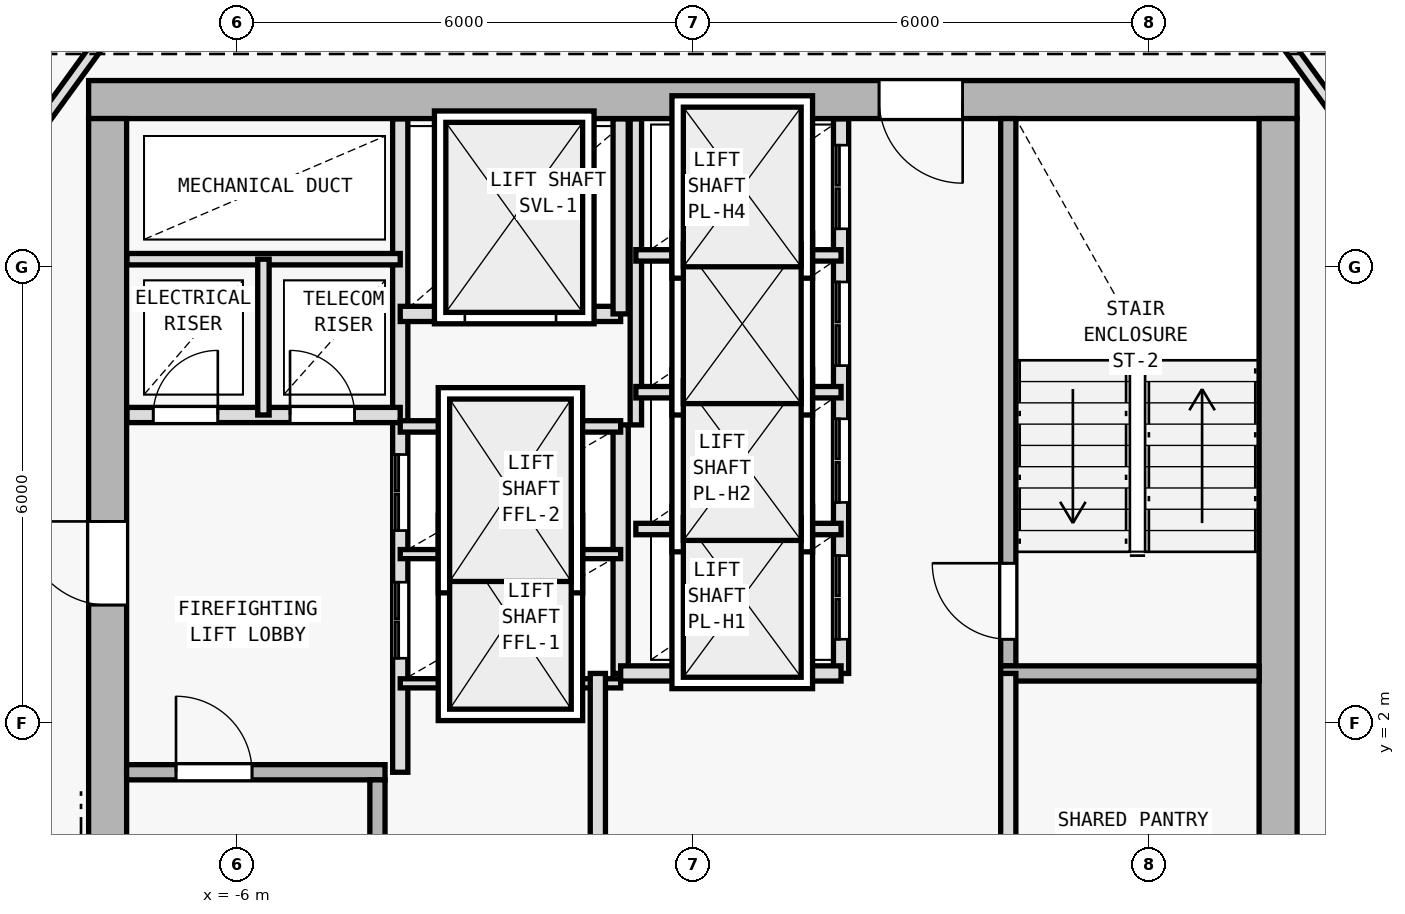
"""IFC4 building model, lengths in metres.
Left out: names, types, materials, properties, quantities, classifications, styles, units other than length and angle.
Written with IfcOpenShell. Run it as: python <this file> out.ifc"""

import sys

from ifc_helpers import new_model, si_unit, direction, frame, frame_2d, origin, origin_2d, place, context, subcontext, project, spatial, rectangle, i_section, extrude, element, fill, save


model = new_model("IFC4")
c1 = context("Model", 3, precision=1e-05, world=origin(), true_north=direction((0.0, 1.0)))
c2 = subcontext(c1, "Body", "Model", "MODEL_VIEW")
j1 = project(units=[si_unit("LENGTHUNIT", "METRE"), si_unit("PLANEANGLEUNIT", "RADIAN")], contexts=[c1])
p1 = place(None, origin())
s1 = spatial("IfcSite", under=j1, at=p1, CompositionType="ELEMENT")
p2 = place(p1, origin())
s2 = spatial("IfcBuilding", under=s1, at=p2, CompositionType="ELEMENT")
p3 = place(p2, frame((0.0, 0.0, 219.9)))
s3 = spatial("IfcBuildingStorey", under=s2, at=p3, CompositionType="ELEMENT", Elevation=219.9)
for number, where, z_axis, x_axis in (
    (1, (7.7, 10.2, 0.0), (0.0, 0.0, 1.0), (1.0, 0.0, 0.0)),
    (2, (-7.7, 10.2, 0.0), (0.0, 0.0, 1.0), (1.0, 0.0, 0.0)),
    (3, (7.7, 0.4, 0.0), (0.0, 0.0, 1.0), (1.0, 0.0, 0.0)),
    (4, (-7.7, 2.0, 0.0), (0.0, 0.0, 1.0), (1.0, 0.0, 0.0)),
):
    element("IfcColumn", number, at=place(p3, frame(where, z_axis=z_axis, x_axis=x_axis)), inside=s3, PredefinedType="COLUMN", context=c2, shape_type="SweptSolid", body=[
        extrude(i_section(OverallWidth=0.398, OverallDepth=0.387, WebThickness=0.013, FlangeThickness=0.022, FilletRadius=0.015, at=origin_2d()), origin(), (0.0, 0.0, 1.0), 3.6),
    ])
p4 = place(p3, frame((7.95, 10.2, 0.0), z_axis=(0.0, 0.0, 1.0), x_axis=(-1.0, 0.0, 0.0)))
e5 = element("IfcWall", 5, at=p4, inside=s3, PredefinedType="SHEAR", context=c2, shape_type="SweptSolid", body=[
    extrude(rectangle(XDim=15.9, YDim=0.5, at=frame_2d((7.95, 0.0))), origin(), (0.0, 0.0, 1.0), 3.35),
])
p5 = place(p4, frame((4.4, 0.0, 0.0)))
e6 = element("IfcOpeningElement", 6, at=p5, cuts=e5, PredefinedType="OPENING", context=c2, shape_type="SweptSolid", body=[
    extrude(rectangle(XDim=1.1, YDim=2.15, at=frame_2d((0.55, 1.075))), frame((0.0, 0.26, 0.0), z_axis=(0.0, -1.0, 0.0), x_axis=(1.0, 0.0, 0.0)), (0.0, 0.0, 1.0), 0.52),
])
p6 = place(p3, frame((-7.7, -9.15, 0.0), z_axis=(0.0, 0.0, 1.0), x_axis=(0.0, 1.0, 0.0)))
e7 = element("IfcWall", 7, at=p6, inside=s3, PredefinedType="SHEAR", context=c2, shape_type="SweptSolid", body=[
    extrude(rectangle(XDim=19.1, YDim=0.5, at=frame_2d((9.55, 0.0))), origin(), (0.0, 0.0, 1.0), 3.35),
])
p7 = place(p6, frame((12.7, 0.0, 0.0)))
e8 = element("IfcOpeningElement", 8, at=p7, cuts=e7, PredefinedType="OPENING", context=c2, shape_type="SweptSolid", body=[
    extrude(rectangle(XDim=1.1, YDim=2.15, at=frame_2d((0.55, 1.075))), frame((0.0, 0.26, 0.0), z_axis=(0.0, -1.0, 0.0), x_axis=(1.0, 0.0, 0.0)), (0.0, 0.0, 1.0), 0.52),
])
p8 = place(p3, frame((7.7, 9.95, 0.0), z_axis=(0.0, 0.0, 1.0), x_axis=(0.0, -1.0, 0.0)))
e9 = element("IfcWall", 9, at=p8, inside=s3, PredefinedType="SHEAR", context=c2, shape_type="SweptSolid", body=[
    extrude(rectangle(XDim=19.1, YDim=0.5, at=frame_2d((9.55, 0.0))), origin(), (0.0, 0.0, 1.0), 3.35),
])
p9 = place(p3, frame((-7.45, 1.35, 0.0), z_axis=(0.0, 0.0, 1.0), x_axis=(1.0, 0.0, 0.0)))
e10 = element("IfcWall", 10, at=p9, inside=s3, PredefinedType="SOLIDWALL", context=c2, shape_type="SweptSolid", body=[
    extrude(rectangle(XDim=3.4, YDim=0.2, at=frame_2d((1.7, 0.0))), origin(), (0.0, 0.0, 1.0), 3.35),
])
p10 = place(p9, frame((0.65, 0.0, 0.0)))
e11 = element("IfcOpeningElement", 11, at=p10, cuts=e10, PredefinedType="OPENING", context=c2, shape_type="SweptSolid", body=[
    extrude(rectangle(XDim=1.0, YDim=2.15, at=frame_2d((0.5, 1.075))), frame((0.0, 0.11, 0.0), z_axis=(0.0, -1.0, 0.0), x_axis=(1.0, 0.0, 0.0)), (0.0, 0.0, 1.0), 0.22),
])
p11 = place(p3, frame((-4.15, -5.95, 0.0), z_axis=(0.0, 0.0, 1.0), x_axis=(0.0, 1.0, 0.0)))
e12 = element("IfcWall", 12, at=p11, inside=s3, PredefinedType="SOLIDWALL", context=c2, shape_type="SweptSolid", body=[
    extrude(rectangle(XDim=7.2, YDim=0.2, at=frame_2d((3.6, 0.0))), origin(), (0.0, 0.0, 1.0), 3.35),
])
p12 = place(p3, frame((-3.85, 1.35, 0.0), z_axis=(0.0, 0.0, 1.0), x_axis=(0.0, 1.0, 0.0)))
e13 = element("IfcWall", 13, at=p12, inside=s3, PredefinedType="SOLIDWALL", context=c2, shape_type="SweptSolid", body=[
    extrude(rectangle(XDim=8.595, YDim=0.2, at=frame_2d((4.297, 0.0))), origin(), (0.0, 0.0, 1.0), 3.35),
])
p13 = place(p12, frame((1.5, 0.0, 0.0)))
e14 = element("IfcOpeningElement", 14, at=p13, cuts=e13, PredefinedType="OPENING", context=c2, shape_type="SweptSolid", body=[
    extrude(rectangle(XDim=1.0, YDim=2.15, at=frame_2d((0.5, 1.075))), frame((0.0, 0.11, 0.0), z_axis=(0.0, -1.0, 0.0), x_axis=(1.0, 0.0, 0.0)), (0.0, 0.0, 1.0), 0.22),
])
p14 = place(p12, frame((3.18, 0.0, 0.0)))
e15 = element("IfcOpeningElement", 15, at=p14, cuts=e13, PredefinedType="OPENING", context=c2, shape_type="SweptSolid", body=[
    extrude(rectangle(XDim=1.0, YDim=2.15, at=frame_2d((0.5, 1.075))), frame((0.0, 0.11, 0.0), z_axis=(0.0, -1.0, 0.0), x_axis=(1.0, 0.0, 0.0)), (0.0, 0.0, 1.0), 0.22),
])
p15 = place(p3, frame((-7.445, 6.05, 0.0), z_axis=(0.0, 0.0, 1.0), x_axis=(1.0, 0.0, 0.0)))
e16 = element("IfcWall", 16, at=p15, inside=s3, PredefinedType="SOLIDWALL", context=c2, shape_type="SweptSolid", body=[
    extrude(rectangle(XDim=3.595, YDim=0.2, at=frame_2d((1.797, 0.0))), origin(), (0.0, 0.0, 1.0), 3.35),
])
p16 = place(p15, frame((0.345, 0.0, 0.0)))
e17 = element("IfcOpeningElement", 17, at=p16, cuts=e16, PredefinedType="OPENING", context=c2, shape_type="SweptSolid", body=[
    extrude(rectangle(XDim=0.85, YDim=2.1, at=frame_2d((0.425, 1.05))), frame((0.0, 0.11, 0.0), z_axis=(0.0, -1.0, 0.0), x_axis=(1.0, 0.0, 0.0)), (0.0, 0.0, 1.0), 0.22),
])
p17 = place(p15, frame((2.145, 0.0, 0.0)))
e18 = element("IfcOpeningElement", 18, at=p17, cuts=e16, PredefinedType="OPENING", context=c2, shape_type="SweptSolid", body=[
    extrude(rectangle(XDim=0.85, YDim=2.1, at=frame_2d((0.425, 1.05))), frame((0.0, 0.11, 0.0), z_axis=(0.0, -1.0, 0.0), x_axis=(1.0, 0.0, 0.0)), (0.0, 0.0, 1.0), 0.22),
])
p18 = place(p3, frame((-7.445, 8.1, 0.0), z_axis=(0.0, 0.0, 1.0), x_axis=(1.0, 0.0, 0.0)))
e19 = element("IfcWall", 19, at=p18, inside=s3, PredefinedType="PARTITIONING", context=c2, shape_type="SweptSolid", body=[
    extrude(rectangle(XDim=3.595, YDim=0.15, at=frame_2d((1.797, 0.0))), origin(), (0.0, 0.0, 1.0), 3.35),
])
p19 = place(p3, frame((-5.65, 6.05, 0.0), z_axis=(0.0, 0.0, 1.0), x_axis=(0.0, 1.0, 0.0)))
e20 = element("IfcWall", 20, at=p19, inside=s3, PredefinedType="PARTITIONING", context=c2, shape_type="SweptSolid", body=[
    extrude(rectangle(XDim=2.05, YDim=0.15, at=frame_2d((1.025, 0.0))), origin(), (0.0, 0.0, 1.0), 3.35),
])
p20 = place(p3, frame((4.15, 2.75, 0.0), z_axis=(0.0, 0.0, 1.0), x_axis=(0.0, 1.0, 0.0)))
e21 = element("IfcWall", 21, at=p20, inside=s3, PredefinedType="SOLIDWALL", context=c2, shape_type="SweptSolid", body=[
    extrude(rectangle(XDim=7.2, YDim=0.2, at=frame_2d((3.6, 0.0))), origin(), (0.0, 0.0, 1.0), 3.35),
])
p21 = place(p20, frame((0.35, 0.0, 0.0)))
e22 = element("IfcOpeningElement", 22, at=p21, cuts=e21, PredefinedType="OPENING", context=c2, shape_type="SweptSolid", body=[
    extrude(rectangle(XDim=1.0, YDim=2.15, at=frame_2d((0.5, 1.075))), frame((0.0, 0.11, 0.0), z_axis=(0.0, -1.0, 0.0), x_axis=(1.0, 0.0, 0.0)), (0.0, 0.0, 1.0), 0.22),
])
p22 = place(p3, frame((4.05, 2.65, 0.0), z_axis=(0.0, 0.0, 1.0), x_axis=(1.0, 0.0, 0.0)))
e23 = element("IfcWall", 23, at=p22, inside=s3, PredefinedType="SOLIDWALL", context=c2, shape_type="SweptSolid", body=[
    extrude(rectangle(XDim=3.4, YDim=0.2, at=frame_2d((1.7, 0.0))), origin(), (0.0, 0.0, 1.0), 3.35),
])
p23 = place(p3, frame((-0.95, 2.65, 0.0), z_axis=(0.0, 0.0, 1.0), x_axis=(0.0, 1.0, 0.0)))
e24 = element("IfcWall", 24, at=p23, inside=s3, PredefinedType="SOLIDWALL", context=c2, shape_type="SweptSolid", body=[
    extrude(rectangle(XDim=3.27, YDim=0.2, at=frame_2d((1.635, 0.0))), origin(), (0.0, 0.0, 1.0), 3.35),
])
for number, where, z_axis, x_axis in (
    (25, (-3.85, 2.52, 0.0), (0.0, 0.0, 1.0), (1.0, 0.0, 0.0)),
    (26, (-3.85, 4.22, 0.0), (0.0, 0.0, 1.0), (1.0, 0.0, 0.0)),
):
    element("IfcWall", number, at=place(p3, frame(where, z_axis=z_axis, x_axis=x_axis)), inside=s3, PredefinedType="PARTITIONING", context=c2, shape_type="SweptSolid", body=[
        extrude(rectangle(XDim=2.9, YDim=0.12, at=frame_2d((1.45, 0.0))), origin(), (0.0, 0.0, 1.0), 3.35),
    ])
p24 = place(p3, frame((-3.85, 5.9, 0.0), z_axis=(0.0, 0.0, 1.0), x_axis=(1.0, 0.0, 0.0)))
e27 = element("IfcWall", 27, at=p24, inside=s3, PredefinedType="PARTITIONING", context=c2, shape_type="SweptSolid", body=[
    extrude(rectangle(XDim=2.9, YDim=0.15, at=frame_2d((1.45, 0.0))), origin(), (0.0, 0.0, 1.0), 3.35),
])
p25 = place(p3, frame((-3.85, 7.38, 0.0), z_axis=(0.0, 0.0, 1.0), x_axis=(1.0, 0.0, 0.0)))
e28 = element("IfcWall", 28, at=p25, inside=s3, PredefinedType="SOLIDWALL", context=c2, shape_type="SweptSolid", body=[
    extrude(rectangle(XDim=2.9, YDim=0.2, at=frame_2d((1.45, 0.0))), origin(), (0.0, 0.0, 1.0), 3.35),
])
p26 = place(p25, frame((0.85, 0.0, 0.0)))
e29 = element("IfcOpeningElement", 29, at=p26, cuts=e28, PredefinedType="OPENING", context=c2, shape_type="SweptSolid", body=[
    extrude(rectangle(XDim=1.2, YDim=2.2, at=frame_2d((0.6, 1.1))), frame((0.0, 0.11, 0.0), z_axis=(0.0, -1.0, 0.0), x_axis=(1.0, 0.0, 0.0)), (0.0, 0.0, 1.0), 0.22),
])
p27 = place(p3, frame((-0.95, 7.38, 0.0), z_axis=(0.0, 0.0, 1.0), x_axis=(0.0, 1.0, 0.0)))
e30 = element("IfcWall", 30, at=p27, inside=s3, PredefinedType="SOLIDWALL", context=c2, shape_type="SweptSolid", body=[
    extrude(rectangle(XDim=2.565, YDim=0.2, at=frame_2d((1.283, 0.0))), origin(), (0.0, 0.0, 1.0), 3.35),
])
p28 = place(p3, frame((4.15, -6.05, 0.0), z_axis=(0.0, 0.0, 1.0), x_axis=(0.0, 1.0, 0.0)))
e31 = element("IfcWall", 31, at=p28, inside=s3, PredefinedType="SOLIDWALL", context=c2, shape_type="SweptSolid", body=[
    extrude(rectangle(XDim=8.7, YDim=0.2, at=frame_2d((4.35, 0.0))), origin(), (0.0, 0.0, 1.0), 3.35),
])
p29 = place(p28, frame((3.6, 0.0, 0.0)))
e32 = element("IfcOpeningElement", 32, at=p29, cuts=e31, PredefinedType="OPENING", context=c2, shape_type="SweptSolid", body=[
    extrude(rectangle(XDim=0.95, YDim=2.1, at=frame_2d((0.475, 1.05))), frame((0.0, 0.11, 0.0), z_axis=(0.0, -1.0, 0.0), x_axis=(1.0, 0.0, 0.0)), (0.0, 0.0, 1.0), 0.22),
])
p30 = place(p3, frame((-1.25, -6.05, 0.0), z_axis=(0.0, 0.0, 1.0), x_axis=(0.0, 1.0, 0.0)))
e33 = element("IfcWall", 33, at=p30, inside=s3, PredefinedType="SOLIDWALL", context=c2, shape_type="SweptSolid", body=[
    extrude(rectangle(XDim=8.7, YDim=0.2, at=frame_2d((4.35, 0.0))), origin(), (0.0, 0.0, 1.0), 3.35),
])
p31 = place(p30, frame((3.4, 0.0, 0.0)))
e34 = element("IfcOpeningElement", 34, at=p31, cuts=e33, PredefinedType="OPENING", context=c2, shape_type="SweptSolid", body=[
    extrude(rectangle(XDim=0.95, YDim=2.1, at=frame_2d((0.475, 1.05))), frame((0.0, 0.11, 0.0), z_axis=(0.0, -1.0, 0.0), x_axis=(1.0, 0.0, 0.0)), (0.0, 0.0, 1.0), 0.22),
])
p32 = place(p3, frame((1.95, 2.65, 0.0), z_axis=(0.0, 0.0, 1.0), x_axis=(0.0, 1.0, 0.0)))
e35 = element("IfcWall", 35, at=p32, inside=s3, PredefinedType="SOLIDWALL", context=c2, shape_type="SweptSolid", body=[
    extrude(rectangle(XDim=7.295, YDim=0.2, at=frame_2d((3.647, 0.0))), origin(), (0.0, 0.0, 1.0), 3.35),
])
p33 = place(p32, frame((0.45, 0.0, 0.0)))
e36 = element("IfcOpeningElement", 36, at=p33, cuts=e35, PredefinedType="OPENING", context=c2, shape_type="SweptSolid", body=[
    extrude(rectangle(XDim=1.1, YDim=2.15, at=frame_2d((0.55, 1.075))), frame((0.0, 0.11, 0.0), z_axis=(0.0, -1.0, 0.0), x_axis=(1.0, 0.0, 0.0)), (0.0, 0.0, 1.0), 0.22),
])
p34 = place(p32, frame((2.25, 0.0, 0.0)))
e37 = element("IfcOpeningElement", 37, at=p34, cuts=e35, PredefinedType="OPENING", context=c2, shape_type="SweptSolid", body=[
    extrude(rectangle(XDim=1.1, YDim=2.15, at=frame_2d((0.55, 1.075))), frame((0.0, 0.11, 0.0), z_axis=(0.0, -1.0, 0.0), x_axis=(1.0, 0.0, 0.0)), (0.0, 0.0, 1.0), 0.22),
])
p35 = place(p32, frame((4.05, 0.0, 0.0)))
e38 = element("IfcOpeningElement", 38, at=p35, cuts=e35, PredefinedType="OPENING", context=c2, shape_type="SweptSolid", body=[
    extrude(rectangle(XDim=1.1, YDim=2.15, at=frame_2d((0.55, 1.075))), frame((0.0, 0.11, 0.0), z_axis=(0.0, -1.0, 0.0), x_axis=(1.0, 0.0, 0.0)), (0.0, 0.0, 1.0), 0.22),
])
p36 = place(p32, frame((5.85, 0.0, 0.0)))
e39 = element("IfcOpeningElement", 39, at=p36, cuts=e35, PredefinedType="OPENING", context=c2, shape_type="SweptSolid", body=[
    extrude(rectangle(XDim=1.1, YDim=2.15, at=frame_2d((0.55, 1.075))), frame((0.0, 0.11, 0.0), z_axis=(0.0, -1.0, 0.0), x_axis=(1.0, 0.0, 0.0)), (0.0, 0.0, 1.0), 0.22),
])
p37 = place(p3, frame((-0.95, 2.65, 0.0), z_axis=(0.0, 0.0, 1.0), x_axis=(1.0, 0.0, 0.0)))
e40 = element("IfcWall", 40, at=p37, inside=s3, PredefinedType="SOLIDWALL", context=c2, shape_type="SweptSolid", body=[
    extrude(rectangle(XDim=2.9, YDim=0.2, at=frame_2d((1.45, 0.0))), origin(), (0.0, 0.0, 1.0), 3.35),
])
p38 = place(p3, frame((-0.75, 5.92, 0.0), z_axis=(0.0, 0.0, 1.0), x_axis=(0.0, 1.0, 0.0)))
e41 = element("IfcWall", 41, at=p38, inside=s3, PredefinedType="PARTITIONING", context=c2, shape_type="SweptSolid", body=[
    extrude(rectangle(XDim=4.025, YDim=0.15, at=frame_2d((2.013, 0.0))), origin(), (0.0, 0.0, 1.0), 3.35),
])
for number, where, z_axis, x_axis in (
    (42, (-0.75, 4.55, 0.0), (0.0, 0.0, 1.0), (1.0, 0.0, 0.0)),
    (43, (-0.75, 6.35, 0.0), (0.0, 0.0, 1.0), (1.0, 0.0, 0.0)),
    (44, (-0.75, 8.15, 0.0), (0.0, 0.0, 1.0), (1.0, 0.0, 0.0)),
):
    element("IfcWall", number, at=place(p3, frame(where, z_axis=z_axis, x_axis=x_axis)), inside=s3, PredefinedType="PARTITIONING", context=c2, shape_type="SweptSolid", body=[
        extrude(rectangle(XDim=2.7, YDim=0.15, at=frame_2d((1.35, 0.0))), origin(), (0.0, 0.0, 1.0), 3.35),
    ])
p39 = place(p3, frame((-9.78, 8.226, 0.0), z_axis=(0.0, 0.0, 1.0), x_axis=(0.586956386413, 0.809618552436, 0.0)))
e45 = element("IfcWall", 45, at=p39, inside=s3, PredefinedType="PARTITIONING", context=c2, shape_type="SweptSolid", body=[
    extrude(rectangle(XDim=5.008, YDim=0.15, at=frame_2d((2.504, 0.0))), origin(), (0.0, 0.0, 1.0), 2.975),
])
p40 = place(p3, frame((6.841, 12.28, 0.0), z_axis=(0.0, 0.0, 1.0), x_axis=(0.586956386413, -0.809618552436, 0.0)))
e46 = element("IfcWall", 46, at=p40, inside=s3, PredefinedType="PARTITIONING", context=c2, shape_type="SweptSolid", body=[
    extrude(rectangle(XDim=5.008, YDim=0.15, at=frame_2d((2.504, 0.0))), origin(), (0.0, 0.0, 1.0), 2.825),
])
p41 = place(p40, frame((0.734, 0.0, 0.0)))
e47 = element("IfcOpeningElement", 47, at=p41, cuts=e46, PredefinedType="OPENING", context=c2, shape_type="SweptSolid", body=[
    extrude(rectangle(XDim=0.9, YDim=2.1, at=frame_2d((0.45, 1.05))), frame((0.0, 0.085, 0.0), z_axis=(0.0, -1.0, 0.0), x_axis=(1.0, 0.0, 0.0)), (0.0, 0.0, 1.0), 0.17),
])
p42 = place(p7, origin())
e48 = element("IfcDoor", 48, at=p42, inside=s3, OperationType="SINGLE_SWING_RIGHT", PredefinedType="DOOR", context=c2, shape_type="SweptSolid", body=[
    extrude(rectangle(XDim=1.1, YDim=2.15, at=frame_2d((0.55, 1.075))), frame((0.0, 0.025, 0.0), z_axis=(0.0, -1.0, 0.0), x_axis=(1.0, 0.0, 0.0)), (0.0, 0.0, 1.0), 0.05),
])
fill(e8, e48)
p43 = place(p5, origin())
e49 = element("IfcDoor", 49, at=p43, inside=s3, OperationType="SINGLE_SWING_LEFT", PredefinedType="DOOR", context=c2, shape_type="SweptSolid", body=[
    extrude(rectangle(XDim=1.1, YDim=2.15, at=frame_2d((0.55, 1.075))), frame((0.0, 0.025, 0.0), z_axis=(0.0, -1.0, 0.0), x_axis=(1.0, 0.0, 0.0)), (0.0, 0.0, 1.0), 0.05),
])
fill(e6, e49)
p44 = place(p10, origin())
e50 = element("IfcDoor", 50, at=p44, inside=s3, OperationType="SINGLE_SWING_LEFT", PredefinedType="DOOR", context=c2, shape_type="SweptSolid", body=[
    extrude(rectangle(XDim=1.0, YDim=2.15, at=frame_2d((0.5, 1.075))), frame((0.0, 0.025, 0.0), z_axis=(0.0, -1.0, 0.0), x_axis=(1.0, 0.0, 0.0)), (0.0, 0.0, 1.0), 0.05),
])
fill(e11, e50)
p45 = place(p16, origin())
e51 = element("IfcDoor", 51, at=p45, inside=s3, OperationType="SINGLE_SWING_RIGHT", PredefinedType="DOOR", context=c2, shape_type="SweptSolid", body=[
    extrude(rectangle(XDim=0.85, YDim=2.1, at=frame_2d((0.425, 1.05))), frame((0.0, 0.025, 0.0), z_axis=(0.0, -1.0, 0.0), x_axis=(1.0, 0.0, 0.0)), (0.0, 0.0, 1.0), 0.05),
])
fill(e17, e51)
p46 = place(p17, origin())
e52 = element("IfcDoor", 52, at=p46, inside=s3, OperationType="SINGLE_SWING_LEFT", PredefinedType="DOOR", context=c2, shape_type="SweptSolid", body=[
    extrude(rectangle(XDim=0.85, YDim=2.1, at=frame_2d((0.425, 1.05))), frame((0.0, 0.025, 0.0), z_axis=(0.0, -1.0, 0.0), x_axis=(1.0, 0.0, 0.0)), (0.0, 0.0, 1.0), 0.05),
])
fill(e18, e52)
p47 = place(p21, origin())
e53 = element("IfcDoor", 53, at=p47, inside=s3, OperationType="SINGLE_SWING_RIGHT", PredefinedType="DOOR", context=c2, shape_type="SweptSolid", body=[
    extrude(rectangle(XDim=1.0, YDim=2.15, at=frame_2d((0.5, 1.075))), frame((0.0, 0.025, 0.0), z_axis=(0.0, -1.0, 0.0), x_axis=(1.0, 0.0, 0.0)), (0.0, 0.0, 1.0), 0.05),
])
fill(e22, e53)
p48 = place(p26, origin())
e54 = element("IfcDoor", 54, at=p48, inside=s3, OperationType="DOUBLE_DOOR_SLIDING", PredefinedType="DOOR", context=c2, shape_type="SweptSolid", body=[
    extrude(rectangle(XDim=1.2, YDim=2.2, at=frame_2d((0.6, 1.1))), frame((0.0, 0.025, 0.0), z_axis=(0.0, -1.0, 0.0), x_axis=(1.0, 0.0, 0.0)), (0.0, 0.0, 1.0), 0.05),
])
fill(e29, e54)
p49 = place(p33, origin())
e55 = element("IfcDoor", 55, at=p49, inside=s3, OperationType="DOUBLE_DOOR_SLIDING", PredefinedType="DOOR", context=c2, shape_type="SweptSolid", body=[
    extrude(rectangle(XDim=1.1, YDim=2.15, at=frame_2d((0.55, 1.075))), frame((0.0, 0.025, 0.0), z_axis=(0.0, -1.0, 0.0), x_axis=(1.0, 0.0, 0.0)), (0.0, 0.0, 1.0), 0.05),
])
fill(e36, e55)
p50 = place(p34, origin())
e56 = element("IfcDoor", 56, at=p50, inside=s3, OperationType="DOUBLE_DOOR_SLIDING", PredefinedType="DOOR", context=c2, shape_type="SweptSolid", body=[
    extrude(rectangle(XDim=1.1, YDim=2.15, at=frame_2d((0.55, 1.075))), frame((0.0, 0.025, 0.0), z_axis=(0.0, -1.0, 0.0), x_axis=(1.0, 0.0, 0.0)), (0.0, 0.0, 1.0), 0.05),
])
fill(e37, e56)
p51 = place(p35, origin())
e57 = element("IfcDoor", 57, at=p51, inside=s3, OperationType="DOUBLE_DOOR_SLIDING", PredefinedType="DOOR", context=c2, shape_type="SweptSolid", body=[
    extrude(rectangle(XDim=1.1, YDim=2.15, at=frame_2d((0.55, 1.075))), frame((0.0, 0.025, 0.0), z_axis=(0.0, -1.0, 0.0), x_axis=(1.0, 0.0, 0.0)), (0.0, 0.0, 1.0), 0.05),
])
fill(e38, e57)
p52 = place(p36, origin())
e58 = element("IfcDoor", 58, at=p52, inside=s3, OperationType="DOUBLE_DOOR_SLIDING", PredefinedType="DOOR", context=c2, shape_type="SweptSolid", body=[
    extrude(rectangle(XDim=1.1, YDim=2.15, at=frame_2d((0.55, 1.075))), frame((0.0, 0.025, 0.0), z_axis=(0.0, -1.0, 0.0), x_axis=(1.0, 0.0, 0.0)), (0.0, 0.0, 1.0), 0.05),
])
fill(e39, e58)
p53 = place(p13, origin())
e59 = element("IfcDoor", 59, at=p53, inside=s3, OperationType="DOUBLE_DOOR_SLIDING", PredefinedType="DOOR", context=c2, shape_type="SweptSolid", body=[
    extrude(rectangle(XDim=1.0, YDim=2.15, at=frame_2d((0.5, 1.075))), frame((0.0, 0.025, 0.0), z_axis=(0.0, -1.0, 0.0), x_axis=(1.0, 0.0, 0.0)), (0.0, 0.0, 1.0), 0.05),
])
fill(e14, e59)
p54 = place(p14, origin())
e60 = element("IfcDoor", 60, at=p54, inside=s3, OperationType="DOUBLE_DOOR_SLIDING", PredefinedType="DOOR", context=c2, shape_type="SweptSolid", body=[
    extrude(rectangle(XDim=1.0, YDim=2.15, at=frame_2d((0.5, 1.075))), frame((0.0, 0.025, 0.0), z_axis=(0.0, -1.0, 0.0), x_axis=(1.0, 0.0, 0.0)), (0.0, 0.0, 1.0), 0.05),
])
fill(e15, e60)
save(model, sys.argv[1])
